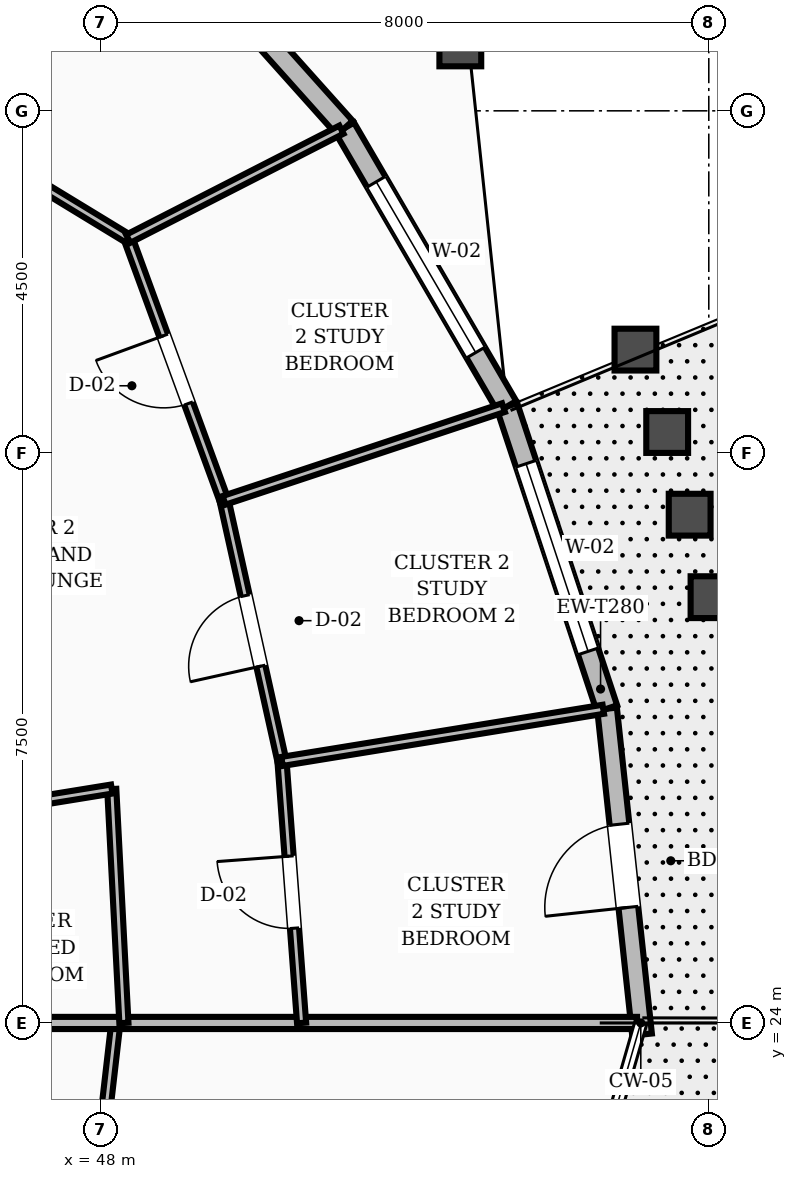
"""IFC4 building model, lengths in metres.
Left out: names, types, materials, properties, quantities, classifications, styles, units other than length and angle.
Written with IfcOpenShell. Run it as: python <this file> out.ifc"""

import sys

from ifc_helpers import new_model, si_unit, direction, frame, frame_2d, origin, place, context, subcontext, project, spatial, rectangle, extrude, element, fill, save


model = new_model("IFC4")
c1 = context("Model", 3, precision=1e-05, world=origin(), true_north=direction((0.0, 1.0)))
c2 = subcontext(c1, "Body", "Model", "MODEL_VIEW")
j1 = project(units=[si_unit("LENGTHUNIT", "METRE"), si_unit("PLANEANGLEUNIT", "RADIAN")], contexts=[c1])
p1 = place(None, origin())
s1 = spatial("IfcSite", under=j1, at=p1, CompositionType="ELEMENT")
p2 = place(p1, origin())
s2 = spatial("IfcBuilding", under=s1, at=p2, CompositionType="ELEMENT")
p3 = place(p2, frame((0.0, 0.0, 222.0)))
s3 = spatial("IfcBuildingStorey", under=s2, at=p3, CompositionType="ELEMENT", Elevation=222.0)
p4 = place(p3, frame((55.122, 23.847, 0.0), z_axis=(0.0, 0.0, 1.0), x_axis=(-0.106721032367, 0.994289002881, 0.0)))
e1 = element("IfcWall", 1, at=p4, inside=s3, PredefinedType="STANDARD", context=c2, shape_type="SweptSolid", body=[
    extrude(rectangle(XDim=4.312, YDim=0.26, at=frame_2d((2.156, 0.0))), origin(), (0.0, 0.0, 1.0), 2.88),
])
p5 = place(p4, frame((1.683, 0.0, 0.0)))
e2 = element("IfcOpeningElement", 2, at=p5, cuts=e1, PredefinedType="OPENING", context=c2, shape_type="SweptSolid", body=[
    extrude(rectangle(XDim=1.1, YDim=2.15, at=frame_2d((0.55, 1.075))), frame((0.0, 0.14, 0.0), z_axis=(0.0, -1.0, 0.0), x_axis=(1.0, 0.0, 0.0)), (0.0, 0.0, 1.0), 0.28),
])
p6 = place(p3, frame((54.662, 28.135, 0.0), z_axis=(0.0, 0.0, 1.0), x_axis=(-0.313988276285, 0.949426859929, 0.0)))
e3 = element("IfcWall", 3, at=p6, inside=s3, PredefinedType="STANDARD", context=c2, shape_type="SweptSolid", body=[
    extrude(rectangle(XDim=4.188, YDim=0.28, at=frame_2d((2.094, 0.0))), origin(), (0.0, 0.0, 1.0), 2.88),
])
p7 = place(p6, frame((0.794, 0.0, 0.8)))
e4 = element("IfcOpeningElement", 4, at=p7, cuts=e3, PredefinedType="OPENING", context=c2, shape_type="SweptSolid", body=[
    extrude(rectangle(XDim=2.6, YDim=1.65, at=frame_2d((1.3, 0.825))), frame((0.0, 0.15, 0.0), z_axis=(0.0, -1.0, 0.0), x_axis=(1.0, 0.0, 0.0)), (0.0, 0.0, 1.0), 0.3),
])
p8 = place(p3, frame((53.347, 32.111, 0.0), z_axis=(0.0, 0.0, 1.0), x_axis=(-0.503498718903, 0.863995972249, 0.0)))
e5 = element("IfcWall", 5, at=p8, inside=s3, PredefinedType="STANDARD", context=c2, shape_type="SweptSolid", body=[
    extrude(rectangle(XDim=4.241, YDim=0.28, at=frame_2d((2.12, 0.0))), origin(), (0.0, 0.0, 1.0), 2.88),
])
p9 = place(p8, frame((0.821, 0.0, 0.8)))
e6 = element("IfcOpeningElement", 6, at=p9, cuts=e5, PredefinedType="OPENING", context=c2, shape_type="SweptSolid", body=[
    extrude(rectangle(XDim=2.6, YDim=1.65, at=frame_2d((1.3, 0.825))), frame((0.0, 0.15, 0.0), z_axis=(0.0, -1.0, 0.0), x_axis=(1.0, 0.0, 0.0)), (0.0, 0.0, 1.0), 0.3),
])
p10 = place(p3, frame((51.211, 35.775, 0.0), z_axis=(0.0, 0.0, 1.0), x_axis=(-0.666726962521, 0.745302057858, 0.0)))
e7 = element("IfcWall", 7, at=p10, inside=s3, PredefinedType="STANDARD", context=c2, shape_type="SweptSolid", body=[
    extrude(rectangle(XDim=4.31, YDim=0.28, at=frame_2d((2.155, 0.0))), origin(), (0.0, 0.0, 1.0), 2.88),
])
p11 = place(p3, frame((47.851, 20.978, 0.0), z_axis=(0.0, 0.0, 1.0), x_axis=(0.114270782561, 0.993449640522, 0.0)))
e8 = element("IfcWall", 8, at=p11, inside=s3, PredefinedType="PARTITIONING", context=c2, shape_type="SweptSolid", body=[
    extrude(rectangle(XDim=3.042, YDim=0.12, at=frame_2d((1.521, 0.0))), origin(), (0.0, 0.0, 1.0), 2.87),
])
p12 = place(p3, frame((44.48, 24.0, 0.0), z_axis=(0.0, 0.0, 1.0), x_axis=(1.0, 0.0, 0.0)))
e9 = element("IfcWall", 9, at=p12, inside=s3, PredefinedType="SOLIDWALL", context=c2, shape_type="SweptSolid", body=[
    extrude(rectangle(XDim=10.575, YDim=0.16, at=frame_2d((5.288, 0.0))), origin(), (0.0, 0.0, 1.0), 2.87),
])
p13 = place(p3, frame((48.305, 24.0, 0.0), z_axis=(0.0, 0.0, 1.0), x_axis=(-0.051893492217, 0.998652625023, 0.0)))
e10 = element("IfcWall", 10, at=p13, inside=s3, PredefinedType="PARTITIONING", context=c2, shape_type="SweptSolid", body=[
    extrude(rectangle(XDim=3.082, YDim=0.12, at=frame_2d((1.541, 0.0))), origin(), (0.0, 0.0, 1.0), 2.87),
])
p14 = place(p3, frame((44.48, 26.482, 0.0), z_axis=(0.0, 0.0, 1.0), x_axis=(0.98707991457, 0.160228718564, 0.0)))
e11 = element("IfcWall", 11, at=p14, inside=s3, PredefinedType="PARTITIONING", context=c2, shape_type="SweptSolid", body=[
    extrude(rectangle(XDim=3.713, YDim=0.12, at=frame_2d((1.857, 0.0))), origin(), (0.0, 0.0, 1.0), 2.87),
])
p15 = place(p14, frame((0.44, 0.0, 0.0)))
e12 = element("IfcOpeningElement", 12, at=p15, cuts=e11, PredefinedType="OPENING", context=c2, shape_type="SweptSolid", body=[
    extrude(rectangle(XDim=0.86, YDim=2.1, at=frame_2d((0.43, 1.05))), frame((0.0, 0.07, 0.0), z_axis=(0.0, -1.0, 0.0), x_axis=(1.0, 0.0, 0.0)), (0.0, 0.0, 1.0), 0.14),
])
p16 = place(p3, frame((50.643, 24.0, 0.0), z_axis=(0.0, 0.0, 1.0), x_axis=(-0.074645712609, 0.997210117071, 0.0)))
e13 = element("IfcWall", 13, at=p16, inside=s3, PredefinedType="PARTITIONING", context=c2, shape_type="SweptSolid", body=[
    extrude(rectangle(XDim=3.45, YDim=0.12, at=frame_2d((1.725, 0.0))), origin(), (0.0, 0.0, 1.0), 2.87),
])
p17 = place(p16, frame((1.25, 0.0, 0.0)))
e14 = element("IfcOpeningElement", 14, at=p17, cuts=e13, PredefinedType="OPENING", context=c2, shape_type="SweptSolid", body=[
    extrude(rectangle(XDim=0.95, YDim=2.1, at=frame_2d((0.475, 1.05))), frame((0.0, 0.07, 0.0), z_axis=(0.0, -1.0, 0.0), x_axis=(1.0, 0.0, 0.0)), (0.0, 0.0, 1.0), 0.14),
])
p18 = place(p3, frame((50.385, 27.441, 0.0), z_axis=(0.0, 0.0, 1.0), x_axis=(-0.216717372339, 0.976234388109, 0.0)))
e15 = element("IfcWall", 15, at=p18, inside=s3, PredefinedType="PARTITIONING", context=c2, shape_type="SweptSolid", body=[
    extrude(rectangle(XDim=3.518, YDim=0.12, at=frame_2d((1.759, 0.0))), origin(), (0.0, 0.0, 1.0), 2.87),
])
p19 = place(p18, frame((1.284, 0.0, 0.0)))
e16 = element("IfcOpeningElement", 16, at=p19, cuts=e15, PredefinedType="OPENING", context=c2, shape_type="SweptSolid", body=[
    extrude(rectangle(XDim=0.95, YDim=2.1, at=frame_2d((0.475, 1.05))), frame((0.0, 0.07, 0.0), z_axis=(0.0, -1.0, 0.0), x_axis=(1.0, 0.0, 0.0)), (0.0, 0.0, 1.0), 0.14),
])
p20 = place(p3, frame((50.385, 27.441, 0.0), z_axis=(0.0, 0.0, 1.0), x_axis=(0.987092082987, 0.160153737718, 0.0)))
e17 = element("IfcWall", 17, at=p20, inside=s3, PredefinedType="PARTITIONING", context=c2, shape_type="SweptSolid", body=[
    extrude(rectangle(XDim=4.282, YDim=0.12, at=frame_2d((2.141, 0.0))), origin(), (0.0, 0.0, 1.0), 2.87),
])
p21 = place(p3, frame((49.623, 30.875, 0.0), z_axis=(0.0, 0.0, 1.0), x_axis=(-0.344047173744, 0.938952364201, 0.0)))
e18 = element("IfcWall", 18, at=p21, inside=s3, PredefinedType="PARTITIONING", context=c2, shape_type="SweptSolid", body=[
    extrude(rectangle(XDim=3.665, YDim=0.12, at=frame_2d((1.833, 0.0))), origin(), (0.0, 0.0, 1.0), 2.87),
])
p22 = place(p21, frame((1.358, 0.0, 0.0)))
e19 = element("IfcOpeningElement", 19, at=p22, cuts=e18, PredefinedType="OPENING", context=c2, shape_type="SweptSolid", body=[
    extrude(rectangle(XDim=0.95, YDim=2.1, at=frame_2d((0.475, 1.05))), frame((0.0, 0.07, 0.0), z_axis=(0.0, -1.0, 0.0), x_axis=(1.0, 0.0, 0.0)), (0.0, 0.0, 1.0), 0.14),
])
p23 = place(p3, frame((49.623, 30.875, 0.0), z_axis=(0.0, 0.0, 1.0), x_axis=(0.949129842821, 0.314884965451, 0.0)))
e20 = element("IfcWall", 20, at=p23, inside=s3, PredefinedType="PARTITIONING", context=c2, shape_type="SweptSolid", body=[
    extrude(rectangle(XDim=3.874, YDim=0.12, at=frame_2d((1.937, 0.0))), origin(), (0.0, 0.0, 1.0), 2.87),
])
p24 = place(p3, frame((48.362, 34.317, 0.0), z_axis=(0.0, 0.0, 1.0), x_axis=(-0.854141598194, 0.520040508262, 0.0)))
e21 = element("IfcWall", 21, at=p24, inside=s3, PredefinedType="PARTITIONING", context=c2, shape_type="SweptSolid", body=[
    extrude(rectangle(XDim=7.367, YDim=0.12, at=frame_2d((3.684, 0.0))), origin(), (0.0, 0.0, 1.0), 2.87),
])
p25 = place(p24, frame((3.208, 0.0, 0.0)))
e22 = element("IfcOpeningElement", 22, at=p25, cuts=e21, PredefinedType="OPENING", context=c2, shape_type="SweptSolid", body=[
    extrude(rectangle(XDim=0.95, YDim=2.1, at=frame_2d((0.475, 1.05))), frame((0.0, 0.07, 0.0), z_axis=(0.0, -1.0, 0.0), x_axis=(1.0, 0.0, 0.0)), (0.0, 0.0, 1.0), 0.14),
])
p26 = place(p3, frame((48.362, 34.317, 0.0), z_axis=(0.0, 0.0, 1.0), x_axis=(0.890235742067, 0.455500080732, 0.0)))
e23 = element("IfcWall", 23, at=p26, inside=s3, PredefinedType="PARTITIONING", context=c2, shape_type="SweptSolid", body=[
    extrude(rectangle(XDim=3.151, YDim=0.12, at=frame_2d((1.576, 0.0))), origin(), (0.0, 0.0, 1.0), 2.87),
])
p27 = place(p5, origin())
e24 = element("IfcDoor", 24, at=p27, inside=s3, OperationType="SINGLE_SWING_LEFT", PredefinedType="DOOR", context=c2, shape_type="SweptSolid", body=[
    extrude(rectangle(XDim=1.1, YDim=2.15, at=frame_2d((0.55, 1.075))), frame((0.0, 0.025, 0.0), z_axis=(0.0, -1.0, 0.0), x_axis=(1.0, 0.0, 0.0)), (0.0, 0.0, 1.0), 0.05),
])
fill(e2, e24)
p28 = place(p7, origin())
e25 = element("IfcWindow", 25, at=p28, inside=s3, PartitioningType="SINGLE_PANEL", PredefinedType="WINDOW", context=c2, shape_type="SweptSolid", body=[
    extrude(rectangle(XDim=2.6, YDim=1.65, at=frame_2d((1.3, 0.825))), frame((0.0, 0.03, 0.0), z_axis=(0.0, -1.0, 0.0), x_axis=(1.0, 0.0, 0.0)), (0.0, 0.0, 1.0), 0.06),
])
fill(e4, e25)
p29 = place(p9, origin())
e26 = element("IfcWindow", 26, at=p29, inside=s3, PartitioningType="SINGLE_PANEL", PredefinedType="WINDOW", context=c2, shape_type="SweptSolid", body=[
    extrude(rectangle(XDim=2.6, YDim=1.65, at=frame_2d((1.3, 0.825))), frame((0.0, 0.03, 0.0), z_axis=(0.0, -1.0, 0.0), x_axis=(1.0, 0.0, 0.0)), (0.0, 0.0, 1.0), 0.06),
])
fill(e6, e26)
p30 = place(p17, origin())
e27 = element("IfcDoor", 27, at=p30, inside=s3, OperationType="SINGLE_SWING_RIGHT", PredefinedType="DOOR", context=c2, shape_type="SweptSolid", body=[
    extrude(rectangle(XDim=0.95, YDim=2.1, at=frame_2d((0.475, 1.05))), frame((0.0, 0.025, 0.0), z_axis=(0.0, -1.0, 0.0), x_axis=(1.0, 0.0, 0.0)), (0.0, 0.0, 1.0), 0.05),
])
fill(e14, e27)
p31 = place(p19, origin())
e28 = element("IfcDoor", 28, at=p31, inside=s3, OperationType="SINGLE_SWING_LEFT", PredefinedType="DOOR", context=c2, shape_type="SweptSolid", body=[
    extrude(rectangle(XDim=0.95, YDim=2.1, at=frame_2d((0.475, 1.05))), frame((0.0, 0.025, 0.0), z_axis=(0.0, -1.0, 0.0), x_axis=(1.0, 0.0, 0.0)), (0.0, 0.0, 1.0), 0.05),
])
fill(e16, e28)
p32 = place(p22, origin())
e29 = element("IfcDoor", 29, at=p32, inside=s3, OperationType="SINGLE_SWING_RIGHT", PredefinedType="DOOR", context=c2, shape_type="SweptSolid", body=[
    extrude(rectangle(XDim=0.95, YDim=2.1, at=frame_2d((0.475, 1.05))), frame((0.0, 0.025, 0.0), z_axis=(0.0, -1.0, 0.0), x_axis=(1.0, 0.0, 0.0)), (0.0, 0.0, 1.0), 0.05),
])
fill(e19, e29)
save(model, sys.argv[1])
